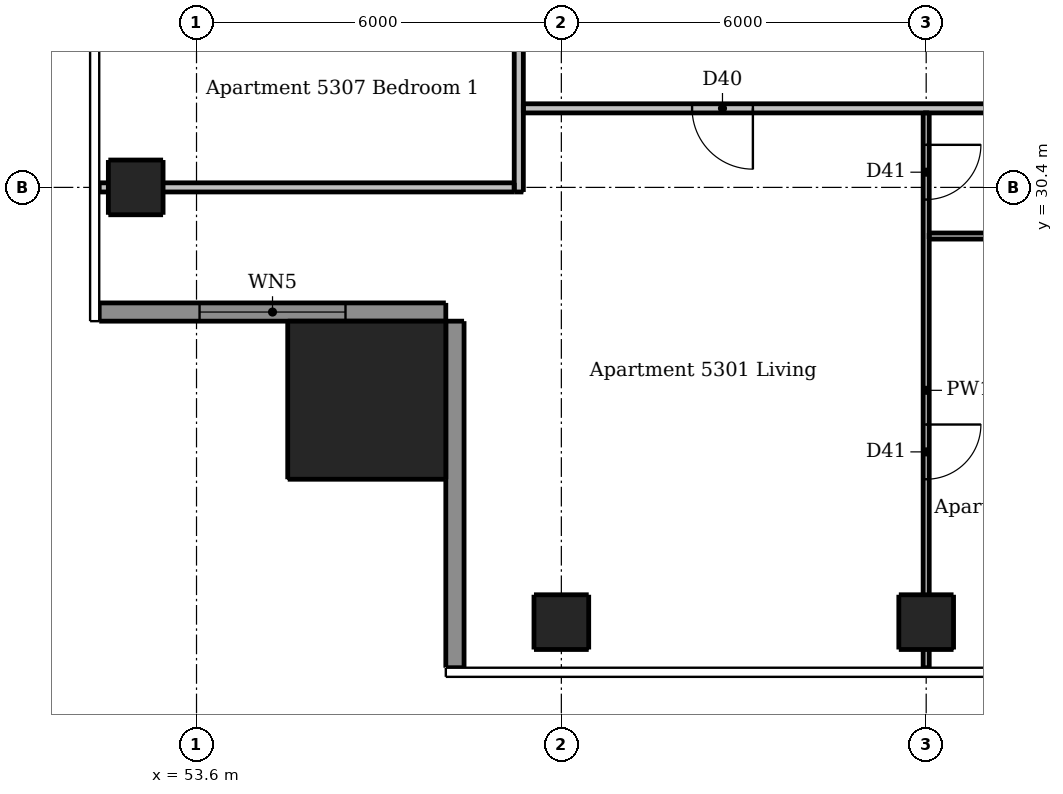
"""IFC4 building model, lengths in metres.
Left out: names, types, materials, properties, quantities, classifications, styles, units other than length and angle.
Written with IfcOpenShell. Run it as: python <this file> out.ifc"""

import sys

from ifc_helpers import new_model, si_unit, direction, frame, frame_2d, origin, origin_2d, place, context, subcontext, project, spatial, rectangle, extrude, element, fill, save


model = new_model("IFC4")
c1 = context("Model", 3, precision=1e-05, world=origin(), true_north=direction((0.0, 1.0)))
c2 = subcontext(c1, "Body", "Model", "MODEL_VIEW")
j1 = project(units=[si_unit("LENGTHUNIT", "METRE"), si_unit("PLANEANGLEUNIT", "RADIAN")], contexts=[c1])
p1 = place(None, origin())
s1 = spatial("IfcSite", under=j1, at=p1, CompositionType="ELEMENT")
p2 = place(p1, origin())
s2 = spatial("IfcBuilding", under=s1, at=p2, CompositionType="ELEMENT")
p3 = place(p2, frame((0.0, 0.0, 200.2)))
s3 = spatial("IfcBuildingStorey", under=s2, at=p3, CompositionType="ELEMENT", Elevation=200.2)
for number, where, z_axis, x_axis in (
    (1, (59.6, 23.25, 0.0), (0.0, 0.0, 1.0), (1.0, 0.0, 0.0)),
    (2, (65.6, 23.25, 0.0), (0.0, 0.0, 1.0), (1.0, 0.0, 0.0)),
    (3, (52.6, 30.4, 0.0), (0.0, 0.0, 1.0), (1.0, 0.0, 0.0)),
):
    element("IfcColumn", number, at=place(p3, frame(where, z_axis=z_axis, x_axis=x_axis)), inside=s3, PredefinedType="COLUMN", context=c2, shape_type="SweptSolid", body=[
        extrude(rectangle(XDim=0.9, YDim=0.9, at=origin_2d()), origin(), (0.0, 0.0, 1.0), 3.05),
    ])
p4 = place(p3, frame((56.4, 26.9, 0.0), z_axis=(0.0, 0.0, 1.0), x_axis=(1.0, 0.0, 0.0)))
e4 = element("IfcColumn", 4, at=p4, inside=s3, PredefinedType="COLUMN", context=c2, shape_type="SweptSolid", body=[
    extrude(rectangle(XDim=2.6, YDim=2.6, at=origin_2d()), origin(), (0.0, 0.0, 1.0), 3.3),
])
p5 = place(p3, frame((52.0, 28.35, 0.0), z_axis=(0.0, 0.0, 1.0), x_axis=(1.0, 0.0, 0.0)))
e5 = element("IfcWall", 5, at=p5, inside=s3, PredefinedType="SOLIDWALL", context=c2, shape_type="SweptSolid", body=[
    extrude(rectangle(XDim=5.7, YDim=0.3, at=frame_2d((2.85, 0.0))), origin(), (0.0, 0.0, 1.0), 3.05),
])
p6 = place(p5, frame((1.65, 0.0, 0.15)))
e6 = element("IfcOpeningElement", 6, at=p6, cuts=e5, PredefinedType="OPENING", context=c2, shape_type="SweptSolid", body=[
    extrude(rectangle(XDim=2.4, YDim=2.1, at=frame_2d((1.2, 1.05))), frame((0.0, 0.16, 0.0), z_axis=(0.0, -1.0, 0.0), x_axis=(1.0, 0.0, 0.0)), (0.0, 0.0, 1.0), 0.32),
])
p7 = place(p3, frame((57.85, 28.2, 0.0), z_axis=(0.0, 0.0, 1.0), x_axis=(0.0, -1.0, 0.0)))
e7 = element("IfcWall", 7, at=p7, inside=s3, PredefinedType="SOLIDWALL", context=c2, shape_type="SweptSolid", body=[
    extrude(rectangle(XDim=5.7, YDim=0.3, at=frame_2d((2.85, 0.0))), origin(), (0.0, 0.0, 1.0), 3.05),
])
p8 = place(p3, frame((65.6, 31.625, 0.0), z_axis=(0.0, 0.0, 1.0), x_axis=(0.0, -1.0, 0.0)))
e8 = element("IfcWall", 8, at=p8, inside=s3, PredefinedType="PARTITIONING", context=c2, shape_type="SweptSolid", body=[
    extrude(rectangle(XDim=9.125, YDim=0.1, at=frame_2d((4.562, 0.0))), origin(), (0.0, 0.0, 1.0), 2.516),
])
p9 = place(p8, frame((0.525, 0.0, 0.0)))
e9 = element("IfcOpeningElement", 9, at=p9, cuts=e8, PredefinedType="OPENING", context=c2, shape_type="SweptSolid", body=[
    extrude(rectangle(XDim=0.9, YDim=2.1, at=frame_2d((0.45, 1.05))), frame((0.0, 0.06, 0.0), z_axis=(0.0, -1.0, 0.0), x_axis=(1.0, 0.0, 0.0)), (0.0, 0.0, 1.0), 0.12),
])
p10 = place(p8, frame((5.125, 0.0, 0.0)))
e10 = element("IfcOpeningElement", 10, at=p10, cuts=e8, PredefinedType="OPENING", context=c2, shape_type="SweptSolid", body=[
    extrude(rectangle(XDim=0.9, YDim=2.1, at=frame_2d((0.45, 1.05))), frame((0.0, 0.06, 0.0), z_axis=(0.0, -1.0, 0.0), x_axis=(1.0, 0.0, 0.0)), (0.0, 0.0, 1.0), 0.12),
])
p11 = place(p3, frame((65.65, 29.6, 0.0), z_axis=(0.0, 0.0, 1.0), x_axis=(1.0, 0.0, 0.0)))
e11 = element("IfcWall", 11, at=p11, inside=s3, PredefinedType="PARTITIONING", context=c2, shape_type="SweptSolid", body=[
    extrude(rectangle(XDim=5.875, YDim=0.1, at=frame_2d((2.938, 0.0))), origin(), (0.0, 0.0, 1.0), 3.05),
])
p12 = place(p11, frame((3.75, 0.0, 0.0)))
e12 = element("IfcOpeningElement", 12, at=p12, cuts=e11, PredefinedType="OPENING", context=c2, shape_type="SweptSolid", body=[
    extrude(rectangle(XDim=0.8, YDim=2.1, at=frame_2d((0.4, 1.05))), frame((0.0, 0.06, 0.0), z_axis=(0.0, -1.0, 0.0), x_axis=(1.0, 0.0, 0.0)), (0.0, 0.0, 1.0), 0.12),
])
p13 = place(p3, frame((58.9, 30.325, 0.0), z_axis=(0.0, 0.0, 1.0), x_axis=(0.0, 1.0, 0.0)))
e13 = element("IfcWall", 13, at=p13, inside=s3, PredefinedType="PARTITIONING", context=c2, shape_type="SweptSolid", body=[
    extrude(rectangle(XDim=30.85, YDim=0.15, at=frame_2d((15.425, 0.0))), origin(), (0.0, 0.0, 1.0), 3.05),
])
p14 = place(p13, frame((7.375, 0.0, 0.0)))
e14 = element("IfcOpeningElement", 14, at=p14, cuts=e13, PredefinedType="OPENING", context=c2, shape_type="SweptSolid", body=[
    extrude(rectangle(XDim=1.0, YDim=2.1, at=frame_2d((0.5, 1.05))), frame((0.0, 0.085, 0.0), z_axis=(0.0, -1.0, 0.0), x_axis=(1.0, 0.0, 0.0)), (0.0, 0.0, 1.0), 0.17),
])
p15 = place(p13, frame((26.925, 0.0, 0.0)))
e15 = element("IfcOpeningElement", 15, at=p15, cuts=e13, PredefinedType="OPENING", context=c2, shape_type="SweptSolid", body=[
    extrude(rectangle(XDim=1.0, YDim=2.1, at=frame_2d((0.5, 1.05))), frame((0.0, 0.085, 0.0), z_axis=(0.0, -1.0, 0.0), x_axis=(1.0, 0.0, 0.0)), (0.0, 0.0, 1.0), 0.17),
])
p16 = place(p3, frame((89.525, 31.7, 0.0), z_axis=(0.0, 0.0, 1.0), x_axis=(-1.0, 0.0, 0.0)))
e16 = element("IfcWall", 16, at=p16, inside=s3, PredefinedType="PARTITIONING", context=c2, shape_type="SweptSolid", body=[
    extrude(rectangle(XDim=30.55, YDim=0.15, at=frame_2d((15.275, 0.0))), origin(), (0.0, 0.0, 1.0), 3.05),
])
p17 = place(p16, frame((26.775, 0.0, 0.0)))
e17 = element("IfcOpeningElement", 17, at=p17, cuts=e16, PredefinedType="OPENING", context=c2, shape_type="SweptSolid", body=[
    extrude(rectangle(XDim=1.0, YDim=2.1, at=frame_2d((0.5, 1.05))), frame((0.0, 0.085, 0.0), z_axis=(0.0, -1.0, 0.0), x_axis=(1.0, 0.0, 0.0)), (0.0, 0.0, 1.0), 0.17),
])
p18 = place(p16, frame((9.075, 0.0, 0.0)))
e18 = element("IfcOpeningElement", 18, at=p18, cuts=e16, PredefinedType="OPENING", context=c2, shape_type="SweptSolid", body=[
    extrude(rectangle(XDim=1.0, YDim=2.1, at=frame_2d((0.5, 1.05))), frame((0.0, 0.085, 0.0), z_axis=(0.0, -1.0, 0.0), x_axis=(1.0, 0.0, 0.0)), (0.0, 0.0, 1.0), 0.17),
])
p19 = place(p3, frame((52.0, 30.4, 0.0), z_axis=(0.0, 0.0, 1.0), x_axis=(1.0, 0.0, 0.0)))
e19 = element("IfcWall", 19, at=p19, inside=s3, PredefinedType="PARTITIONING", context=c2, shape_type="SweptSolid", body=[
    extrude(rectangle(XDim=6.825, YDim=0.15, at=frame_2d((3.413, 0.0))), origin(), (0.0, 0.0, 1.0), 2.647),
])
p20 = place(p6, origin())
e20 = element("IfcWindow", 20, at=p20, inside=s3, PartitioningType="DOUBLE_PANEL_VERTICAL", PredefinedType="WINDOW", context=c2, shape_type="SweptSolid", body=[
    extrude(rectangle(XDim=2.4, YDim=2.1, at=frame_2d((1.2, 1.05))), frame((0.0, 0.03, 0.0), z_axis=(0.0, -1.0, 0.0), x_axis=(1.0, 0.0, 0.0)), (0.0, 0.0, 1.0), 0.06),
])
fill(e6, e20)
p21 = place(p17, origin())
e21 = element("IfcDoor", 21, at=p21, inside=s3, OperationType="SINGLE_SWING_LEFT", PredefinedType="DOOR", context=c2, shape_type="SweptSolid", body=[
    extrude(rectangle(XDim=1.0, YDim=2.1, at=frame_2d((0.5, 1.05))), frame((0.0, 0.025, 0.0), z_axis=(0.0, -1.0, 0.0), x_axis=(1.0, 0.0, 0.0)), (0.0, 0.0, 1.0), 0.05),
])
fill(e17, e21)
p22 = place(p9, origin())
e22 = element("IfcDoor", 22, at=p22, inside=s3, OperationType="SINGLE_SWING_LEFT", PredefinedType="DOOR", context=c2, shape_type="SweptSolid", body=[
    extrude(rectangle(XDim=0.9, YDim=2.1, at=frame_2d((0.45, 1.05))), frame((0.0, 0.025, 0.0), z_axis=(0.0, -1.0, 0.0), x_axis=(1.0, 0.0, 0.0)), (0.0, 0.0, 1.0), 0.05),
])
fill(e9, e22)
p23 = place(p10, origin())
e23 = element("IfcDoor", 23, at=p23, inside=s3, OperationType="SINGLE_SWING_LEFT", PredefinedType="DOOR", context=c2, shape_type="SweptSolid", body=[
    extrude(rectangle(XDim=0.9, YDim=2.1, at=frame_2d((0.45, 1.05))), frame((0.0, 0.025, 0.0), z_axis=(0.0, -1.0, 0.0), x_axis=(1.0, 0.0, 0.0)), (0.0, 0.0, 1.0), 0.05),
])
fill(e10, e23)
save(model, sys.argv[1])
